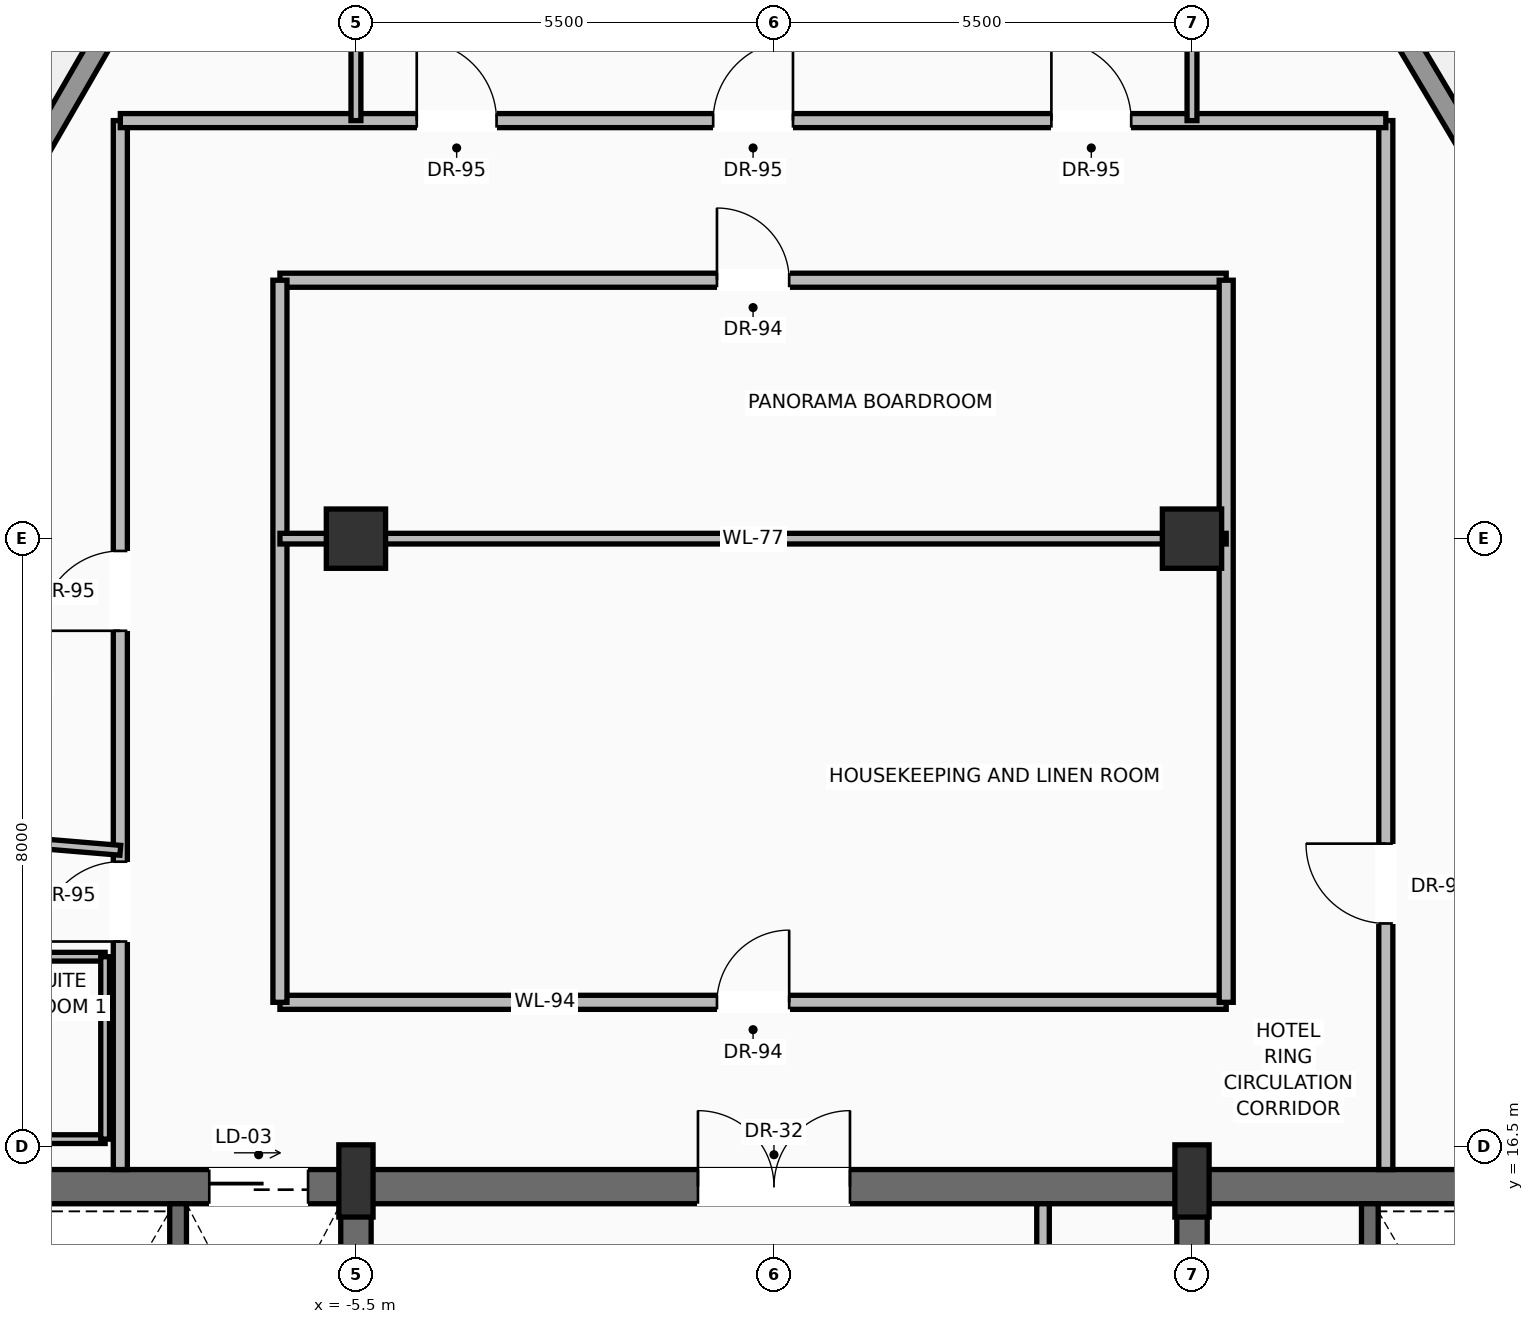
"""IFC4 building model, lengths in metres.
Left out: names, types, materials, properties, quantities, classifications, styles, units other than length and angle.
Written with IfcOpenShell. Run it as: python <this file> out.ifc"""

import sys

from ifc_helpers import new_model, si_unit, direction, frame, frame_2d, origin, origin_2d, place, context, subcontext, project, spatial, rectangle, extrude, source, transform, mapped, element, fill, save


model = new_model("IFC4")
c1 = context("Model", 3, precision=1e-05, world=origin(), true_north=direction((0.0, 1.0)))
c2 = subcontext(c1, "Body", "Model", "MODEL_VIEW")
j1 = project(units=[si_unit("LENGTHUNIT", "METRE"), si_unit("PLANEANGLEUNIT", "RADIAN")], contexts=[c1])
p1 = place(None, origin())
s1 = spatial("IfcSite", under=j1, at=p1, CompositionType="ELEMENT")
p2 = place(p1, origin())
s2 = spatial("IfcBuilding", under=s1, at=p2, CompositionType="ELEMENT")
p3 = place(p2, frame((0.0, 0.0, 273.0)))
s3 = spatial("IfcBuildingStorey", under=s2, at=p3, CompositionType="ELEMENT", Elevation=273.0)
p4 = place(p3, frame((-10.6, 15.975, 0.0), z_axis=(0.0, 0.0, 1.0), x_axis=(1.0, 0.0, 0.0)))
e1 = element("IfcWall", 1, at=p4, inside=s3, PredefinedType="SHEAR", context=c2, shape_type="SweptSolid", body=[
    extrude(rectangle(XDim=21.2, YDim=0.45, at=frame_2d((10.6, 0.0))), origin(), (0.0, 0.0, 1.0), 3.24),
])
p5 = place(p4, frame((3.17, 0.0, 0.0)))
e2 = element("IfcOpeningElement", 2, at=p5, cuts=e1, PredefinedType="OPENING", context=c2, shape_type="SweptSolid", body=[
    extrude(rectangle(XDim=1.3, YDim=2.3, at=frame_2d((0.65, 1.15))), frame((0.0, 0.235, 0.0), z_axis=(0.0, -1.0, 0.0), x_axis=(1.0, 0.0, 0.0)), (0.0, 0.0, 1.0), 0.47),
])
p6 = place(p4, frame((9.6, 0.0, 0.0)))
e3 = element("IfcOpeningElement", 3, at=p6, cuts=e1, PredefinedType="OPENING", context=c2, shape_type="SweptSolid", body=[
    extrude(rectangle(XDim=2.0, YDim=2.4, at=frame_2d((1.0, 1.2))), frame((0.0, 0.235, 0.0), z_axis=(0.0, -1.0, 0.0), x_axis=(1.0, 0.0, 0.0)), (0.0, 0.0, 1.0), 0.47),
])
p7 = place(p3, frame((-5.5, 0.625, 0.0), z_axis=(0.0, 0.0, 1.0), x_axis=(0.0, 1.0, 0.0)))
e4 = element("IfcWall", 4, at=p7, inside=s3, PredefinedType="SHEAR", context=c2, shape_type="SweptSolid", body=[
    extrude(rectangle(XDim=15.35, YDim=0.4, at=frame_2d((7.675, 0.0))), origin(), (0.0, 0.0, 1.0), 3.24),
])
p8 = place(p7, frame((8.875, 0.0, 0.0)))
e5 = element("IfcOpeningElement", 5, at=p8, cuts=e4, PredefinedType="OPENING", context=c2, shape_type="SweptSolid", body=[
    extrude(rectangle(XDim=1.1, YDim=2.2, at=frame_2d((0.55, 1.1))), frame((0.0, 0.21, 0.0), z_axis=(0.0, -1.0, 0.0), x_axis=(1.0, 0.0, 0.0)), (0.0, 0.0, 1.0), 0.42),
])
p9 = place(p3, frame((5.5, 0.625, 0.0), z_axis=(0.0, 0.0, 1.0), x_axis=(0.0, 1.0, 0.0)))
e6 = element("IfcWall", 6, at=p9, inside=s3, PredefinedType="SHEAR", context=c2, shape_type="SweptSolid", body=[
    extrude(rectangle(XDim=15.35, YDim=0.4, at=frame_2d((7.675, 0.0))), origin(), (0.0, 0.0, 1.0), 3.24),
])
p10 = place(p9, frame((8.875, 0.0, 0.0)))
e7 = element("IfcOpeningElement", 7, at=p10, cuts=e6, PredefinedType="OPENING", context=c2, shape_type="SweptSolid", body=[
    extrude(rectangle(XDim=1.1, YDim=2.2, at=frame_2d((0.55, 1.1))), frame((0.0, 0.21, 0.0), z_axis=(0.0, -1.0, 0.0), x_axis=(1.0, 0.0, 0.0)), (0.0, 0.0, 1.0), 0.42),
])
m1 = source(origin(), c2, "Body", "SweptSolid", [
    extrude(rectangle(XDim=0.45, YDim=0.95, at=origin_2d()), origin(), (0.0, 0.0, 1.0), 3.45),
])
for number, where, z_axis, x_axis in (
    (8, (-5.5, 16.05, 0.0), (0.0, 0.0, 1.0), (1.0, 0.0, 0.0)),
    (9, (5.5, 16.05, 0.0), (0.0, 0.0, 1.0), (1.0, 0.0, 0.0)),
):
    element("IfcColumn", number, at=place(p3, frame(where, z_axis=z_axis, x_axis=x_axis)), inside=s3, PredefinedType="PILASTER", context=c2, shape_type="MappedRepresentation", body=[
        mapped(m1, transform((0.0, 0.0, 0.0), scale=1.0)),
    ])
m2 = source(origin(), c2, "Body", "SweptSolid", [
    extrude(rectangle(XDim=0.78, YDim=0.78, at=origin_2d()), origin(), (0.0, 0.0, 1.0), 3.45),
])
for number, where, z_axis, x_axis in (
    (10, (-5.5, 24.5, 0.0), (0.0, 0.0, 1.0), (1.0, 0.0, 0.0)),
    (11, (5.5, 24.5, 0.0), (0.0, 0.0, 1.0), (1.0, 0.0, 0.0)),
):
    element("IfcColumn", number, at=place(p3, frame(where, z_axis=z_axis, x_axis=x_axis)), inside=s3, PredefinedType="COLUMN", context=c2, shape_type="MappedRepresentation", body=[
        mapped(m2, transform((0.0, 0.0, 0.0), scale=1.0)),
    ])
p11 = place(p3, frame((-18.529, 14.308, 0.0), z_axis=(0.0, 0.0, 1.0), x_axis=(0.500615740451, 0.86566961389, 0.0)))
e12 = element("IfcWall", 12, at=p11, inside=s3, PredefinedType="SOLIDWALL", context=c2, shape_type="SweptSolid", body=[
    extrude(rectangle(XDim=20.05, YDim=0.28, at=frame_2d((10.025, 0.0))), origin(), (0.0, 0.0, 1.0), 2.82),
])
p12 = place(p11, frame((4.812, 0.0, 0.0)))
e13 = element("IfcOpeningElement", 13, at=p12, cuts=e12, PredefinedType="OPENING", context=c2, shape_type="SweptSolid", body=[
    extrude(rectangle(XDim=1.6, YDim=2.35, at=frame_2d((0.8, 1.175))), frame((0.0, 0.15, 0.0), z_axis=(0.0, -1.0, 0.0), x_axis=(1.0, 0.0, 0.0)), (0.0, 0.0, 1.0), 0.3),
])
p13 = place(p11, frame((13.634, 0.0, 0.9)))
e14 = element("IfcOpeningElement", 14, at=p13, cuts=e12, PredefinedType="OPENING", context=c2, shape_type="SweptSolid", body=[
    extrude(rectangle(XDim=1.55, YDim=1.75, at=frame_2d((0.775, 0.875))), frame((0.0, 0.15, 0.0), z_axis=(0.0, -1.0, 0.0), x_axis=(1.0, 0.0, 0.0)), (0.0, 0.0, 1.0), 0.3),
])
p14 = place(p3, frame((7.892, 31.777, 0.0), z_axis=(0.0, 0.0, 1.0), x_axis=(0.511386799139, -0.85935065117, 0.0)))
e15 = element("IfcWall", 15, at=p14, inside=s3, PredefinedType="SOLIDWALL", context=c2, shape_type="SweptSolid", body=[
    extrude(rectangle(XDim=19.989, YDim=0.28, at=frame_2d((9.994, 0.0))), origin(), (0.0, 0.0, 1.0), 2.82),
])
p15 = place(p14, frame((4.797, 0.0, 0.0)))
e16 = element("IfcOpeningElement", 16, at=p15, cuts=e15, PredefinedType="OPENING", context=c2, shape_type="SweptSolid", body=[
    extrude(rectangle(XDim=1.6, YDim=2.35, at=frame_2d((0.8, 1.175))), frame((0.0, 0.15, 0.0), z_axis=(0.0, -1.0, 0.0), x_axis=(1.0, 0.0, 0.0)), (0.0, 0.0, 1.0), 0.3),
])
p16 = place(p14, frame((13.592, 0.0, 0.9)))
e17 = element("IfcOpeningElement", 17, at=p16, cuts=e15, PredefinedType="OPENING", context=c2, shape_type="SweptSolid", body=[
    extrude(rectangle(XDim=1.55, YDim=1.75, at=frame_2d((0.775, 0.875))), frame((0.0, 0.15, 0.0), z_axis=(0.0, -1.0, 0.0), x_axis=(1.0, 0.0, 0.0)), (0.0, 0.0, 1.0), 0.3),
])
for number, where, z_axis, x_axis in (
    (18, (-7.84, 11.87, 0.0), (0.0, 0.0, 1.0), (0.0, 1.0, 0.0)),
    (19, (7.84, 11.87, 0.0), (0.0, 0.0, 1.0), (0.0, 1.0, 0.0)),
):
    element("IfcWall", number, at=place(p3, frame(where, z_axis=z_axis, x_axis=x_axis)), inside=s3, PredefinedType="SOLIDWALL", context=c2, shape_type="SweptSolid", body=[
        extrude(rectangle(XDim=3.88, YDim=0.22, at=frame_2d((1.94, 0.0))), origin(), (0.0, 0.0, 1.0), 3.24),
    ])
p17 = place(p3, frame((3.54, 11.22, 0.0), z_axis=(0.0, 0.0, 1.0), x_axis=(0.0, 1.0, 0.0)))
e20 = element("IfcWall", 20, at=p17, inside=s3, PredefinedType="PARTITIONING", context=c2, shape_type="SweptSolid", body=[
    extrude(rectangle(XDim=4.53, YDim=0.165, at=frame_2d((2.265, 0.0))), origin(), (0.0, 0.0, 1.0), 3.232),
])
p18 = place(p17, frame((1.25, 0.0, 0.0)))
e21 = element("IfcOpeningElement", 21, at=p18, cuts=e20, PredefinedType="OPENING", context=c2, shape_type="SweptSolid", body=[
    extrude(rectangle(XDim=0.9, YDim=2.1, at=frame_2d((0.45, 1.05))), frame((0.0, 0.093, 0.0), z_axis=(0.0, -1.0, 0.0), x_axis=(1.0, 0.0, 0.0)), (0.0, 0.0, 1.0), 0.185),
])
p19 = place(p3, frame((-6.5, 18.4, 0.0), z_axis=(0.0, 0.0, 1.0), x_axis=(1.0, 0.0, 0.0)))
e22 = element("IfcWall", 22, at=p19, inside=s3, PredefinedType="PARTITIONING", context=c2, shape_type="SweptSolid", body=[
    extrude(rectangle(XDim=12.45, YDim=0.185, at=frame_2d((6.225, 0.0))), origin(), (0.0, 0.0, 1.0), 3.232),
])
p20 = place(p19, frame((5.75, 0.0, 0.0)))
e23 = element("IfcOpeningElement", 23, at=p20, cuts=e22, PredefinedType="OPENING", context=c2, shape_type="SweptSolid", body=[
    extrude(rectangle(XDim=0.95, YDim=2.2, at=frame_2d((0.475, 1.1))), frame((0.0, 0.103, 0.0), z_axis=(0.0, -1.0, 0.0), x_axis=(1.0, 0.0, 0.0)), (0.0, 0.0, 1.0), 0.205),
])
p21 = place(p3, frame((-6.5, 27.9, 0.0), z_axis=(0.0, 0.0, 1.0), x_axis=(1.0, 0.0, 0.0)))
e24 = element("IfcWall", 24, at=p21, inside=s3, PredefinedType="PARTITIONING", context=c2, shape_type="SweptSolid", body=[
    extrude(rectangle(XDim=12.45, YDim=0.185, at=frame_2d((6.225, 0.0))), origin(), (0.0, 0.0, 1.0), 2.885),
])
p22 = place(p21, frame((5.75, 0.0, 0.0)))
e25 = element("IfcOpeningElement", 25, at=p22, cuts=e24, PredefinedType="OPENING", context=c2, shape_type="SweptSolid", body=[
    extrude(rectangle(XDim=0.95, YDim=2.2, at=frame_2d((0.475, 1.1))), frame((0.0, 0.103, 0.0), z_axis=(0.0, -1.0, 0.0), x_axis=(1.0, 0.0, 0.0)), (0.0, 0.0, 1.0), 0.205),
])
for number, where, z_axis, x_axis in (
    (26, (-6.5, 18.4, 0.0), (0.0, 0.0, 1.0), (0.0, 1.0, 0.0)),
    (27, (5.95, 18.4, 0.0), (0.0, 0.0, 1.0), (0.0, 1.0, 0.0)),
):
    element("IfcWall", number, at=place(p3, frame(where, z_axis=z_axis, x_axis=x_axis)), inside=s3, PredefinedType="PARTITIONING", context=c2, shape_type="SweptSolid", body=[
        extrude(rectangle(XDim=9.5, YDim=0.185, at=frame_2d((4.75, 0.0))), origin(), (0.0, 0.0, 1.0), 3.232),
    ])
p23 = place(p3, frame((-8.6, 16.2, 0.0), z_axis=(0.0, 0.0, 1.0), x_axis=(0.0, 1.0, 0.0)))
e28 = element("IfcWall", 28, at=p23, inside=s3, PredefinedType="PARTITIONING", context=c2, shape_type="SweptSolid", body=[
    extrude(rectangle(XDim=13.8, YDim=0.185, at=frame_2d((6.9, 0.0))), origin(), (0.0, 0.0, 1.0), 3.232),
])
p24 = place(p23, frame((3.0, 0.0, 0.0)))
e29 = element("IfcOpeningElement", 29, at=p24, cuts=e28, PredefinedType="OPENING", context=c2, shape_type="SweptSolid", body=[
    extrude(rectangle(XDim=1.05, YDim=2.25, at=frame_2d((0.525, 1.125))), frame((0.0, 0.103, 0.0), z_axis=(0.0, -1.0, 0.0), x_axis=(1.0, 0.0, 0.0)), (0.0, 0.0, 1.0), 0.205),
])
p25 = place(p23, frame((7.088, 0.0, 0.0)))
e30 = element("IfcOpeningElement", 30, at=p25, cuts=e28, PredefinedType="OPENING", context=c2, shape_type="SweptSolid", body=[
    extrude(rectangle(XDim=1.05, YDim=2.25, at=frame_2d((0.525, 1.125))), frame((0.0, 0.103, 0.0), z_axis=(0.0, -1.0, 0.0), x_axis=(1.0, 0.0, 0.0)), (0.0, 0.0, 1.0), 0.205),
])
p26 = place(p3, frame((8.05, 16.2, 0.0), z_axis=(0.0, 0.0, 1.0), x_axis=(0.0, 1.0, 0.0)))
e31 = element("IfcWall", 31, at=p26, inside=s3, PredefinedType="PARTITIONING", context=c2, shape_type="SweptSolid", body=[
    extrude(rectangle(XDim=13.8, YDim=0.185, at=frame_2d((6.9, 0.0))), origin(), (0.0, 0.0, 1.0), 3.232),
])
p27 = place(p26, frame((3.238, 0.0, 0.0)))
e32 = element("IfcOpeningElement", 32, at=p27, cuts=e31, PredefinedType="OPENING", context=c2, shape_type="SweptSolid", body=[
    extrude(rectangle(XDim=1.05, YDim=2.25, at=frame_2d((0.525, 1.125))), frame((0.0, 0.103, 0.0), z_axis=(0.0, -1.0, 0.0), x_axis=(1.0, 0.0, 0.0)), (0.0, 0.0, 1.0), 0.205),
])
p28 = place(p3, frame((-8.6, 30.0, 0.0), z_axis=(0.0, 0.0, 1.0), x_axis=(1.0, 0.0, 0.0)))
e33 = element("IfcWall", 33, at=p28, inside=s3, PredefinedType="PARTITIONING", context=c2, shape_type="SweptSolid", body=[
    extrude(rectangle(XDim=16.65, YDim=0.185, at=frame_2d((8.325, 0.0))), origin(), (0.0, 0.0, 1.0), 3.232),
])
p29 = place(p28, frame((3.9, 0.0, 0.0)))
e34 = element("IfcOpeningElement", 34, at=p29, cuts=e33, PredefinedType="OPENING", context=c2, shape_type="SweptSolid", body=[
    extrude(rectangle(XDim=1.05, YDim=2.25, at=frame_2d((0.525, 1.125))), frame((0.0, 0.103, 0.0), z_axis=(0.0, -1.0, 0.0), x_axis=(1.0, 0.0, 0.0)), (0.0, 0.0, 1.0), 0.205),
])
p30 = place(p28, frame((7.8, 0.0, 0.0)))
e35 = element("IfcOpeningElement", 35, at=p30, cuts=e33, PredefinedType="OPENING", context=c2, shape_type="SweptSolid", body=[
    extrude(rectangle(XDim=1.05, YDim=2.25, at=frame_2d((0.525, 1.125))), frame((0.0, 0.103, 0.0), z_axis=(0.0, -1.0, 0.0), x_axis=(1.0, 0.0, 0.0)), (0.0, 0.0, 1.0), 0.205),
])
p31 = place(p28, frame((12.25, 0.0, 0.0)))
e36 = element("IfcOpeningElement", 36, at=p31, cuts=e33, PredefinedType="OPENING", context=c2, shape_type="SweptSolid", body=[
    extrude(rectangle(XDim=1.05, YDim=2.25, at=frame_2d((0.525, 1.125))), frame((0.0, 0.103, 0.0), z_axis=(0.0, -1.0, 0.0), x_axis=(1.0, 0.0, 0.0)), (0.0, 0.0, 1.0), 0.205),
])
p32 = place(p3, frame((-6.5, 24.5, 0.0), z_axis=(0.0, 0.0, 1.0), x_axis=(1.0, 0.0, 0.0)))
e37 = element("IfcWall", 37, at=p32, inside=s3, PredefinedType="PARTITIONING", context=c2, shape_type="SweptSolid", body=[
    extrude(rectangle(XDim=12.45, YDim=0.14, at=frame_2d((6.225, 0.0))), origin(), (0.0, 0.0, 1.0), 2.683),
])
p33 = place(p3, frame((-5.5, 30.0, 0.0), z_axis=(0.0, 0.0, 1.0), x_axis=(0.0, 1.0, 0.0)))
e38 = element("IfcWall", 38, at=p33, inside=s3, PredefinedType="PARTITIONING", context=c2, shape_type="SweptSolid", body=[
    extrude(rectangle(XDim=7.096, YDim=0.13, at=frame_2d((3.548, 0.0))), origin(), (0.0, 0.0, 1.0), 2.683),
])
p34 = place(p3, frame((5.5, 30.0, 0.0), z_axis=(0.0, 0.0, 1.0), x_axis=(0.0, 1.0, 0.0)))
e39 = element("IfcWall", 39, at=p34, inside=s3, PredefinedType="PARTITIONING", context=c2, shape_type="SweptSolid", body=[
    extrude(rectangle(XDim=6.05, YDim=0.13, at=frame_2d((3.025, 0.0))), origin(), (0.0, 0.0, 1.0), 2.683),
])
for number, where, z_axis, x_axis in (
    (40, (-11.45, 16.6, 0.0), (0.0, 0.0, 1.0), (1.0, 0.0, 0.0)),
    (41, (-11.45, 19.0, 0.0), (0.0, 0.0, 1.0), (1.0, 0.0, 0.0)),
):
    element("IfcWall", number, at=place(p3, frame(where, z_axis=z_axis, x_axis=x_axis)), inside=s3, PredefinedType="PARTITIONING", context=c2, shape_type="SweptSolid", body=[
        extrude(rectangle(XDim=2.65, YDim=0.115, at=frame_2d((1.325, 0.0))), origin(), (0.0, 0.0, 1.0), 3.232),
    ])
p35 = place(p3, frame((-8.8, 16.6, 0.0), z_axis=(0.0, 0.0, 1.0), x_axis=(0.0, 1.0, 0.0)))
e42 = element("IfcWall", 42, at=p35, inside=s3, PredefinedType="PARTITIONING", context=c2, shape_type="SweptSolid", body=[
    extrude(rectangle(XDim=2.4, YDim=0.115, at=frame_2d((1.2, 0.0))), origin(), (0.0, 0.0, 1.0), 3.232),
])
p36 = place(p3, frame((-14.855, 20.919, 0.0), z_axis=(0.0, 0.0, 1.0), x_axis=(0.996575202115, -0.082691393322, 0.0)))
e43 = element("IfcWall", 43, at=p36, inside=s3, PredefinedType="PARTITIONING", context=c2, shape_type="SweptSolid", body=[
    extrude(rectangle(XDim=6.277, YDim=0.13, at=frame_2d((3.138, 0.0))), origin(), (0.0, 0.0, 1.0), 3.232),
])
m3 = source(origin(), c2, "Body", "SweptSolid", [
    extrude(rectangle(XDim=1.3, YDim=2.3, at=frame_2d((0.65, 1.15))), frame((0.0, 0.025, 0.0), z_axis=(0.0, -1.0, 0.0), x_axis=(1.0, 0.0, 0.0)), (0.0, 0.0, 1.0), 0.05),
])
p37 = place(p5, origin())
e44 = element("IfcDoor", 44, at=p37, inside=s3, OperationType="SLIDING_TO_RIGHT", PredefinedType="DOOR", context=c2, shape_type="MappedRepresentation", body=[
    mapped(m3, transform((0.0, 0.0, 0.0), scale=1.0)),
])
fill(e2, e44)
m4 = source(origin(), c2, "Body", "SweptSolid", [
    extrude(rectangle(XDim=2.0, YDim=2.4, at=frame_2d((1.0, 1.2))), frame((0.0, 0.025, 0.0), z_axis=(0.0, -1.0, 0.0), x_axis=(1.0, 0.0, 0.0)), (0.0, 0.0, 1.0), 0.05),
])
p38 = place(p6, origin())
e45 = element("IfcDoor", 45, at=p38, inside=s3, OperationType="DOUBLE_DOOR_SINGLE_SWING", PredefinedType="DOOR", context=c2, shape_type="MappedRepresentation", body=[
    mapped(m4, transform((0.0, 0.0, 0.0), scale=1.0)),
])
fill(e3, e45)
m5 = source(origin(), c2, "Body", "SweptSolid", [
    extrude(rectangle(XDim=0.95, YDim=2.2, at=frame_2d((0.475, 1.1))), frame((0.0, 0.025, 0.0), z_axis=(0.0, -1.0, 0.0), x_axis=(1.0, 0.0, 0.0)), (0.0, 0.0, 1.0), 0.05),
])
p39 = place(p20, origin())
e46 = element("IfcDoor", 46, at=p39, inside=s3, OperationType="SINGLE_SWING_RIGHT", PredefinedType="DOOR", context=c2, shape_type="MappedRepresentation", body=[
    mapped(m5, transform((0.0, 0.0, 0.0), scale=1.0)),
])
fill(e23, e46)
p40 = place(p22, origin())
e47 = element("IfcDoor", 47, at=p40, inside=s3, OperationType="SINGLE_SWING_LEFT", PredefinedType="DOOR", context=c2, shape_type="MappedRepresentation", body=[
    mapped(m5, transform((0.0, 0.0, 0.0), scale=1.0)),
])
fill(e25, e47)
m6 = source(origin(), c2, "Body", "SweptSolid", [
    extrude(rectangle(XDim=1.05, YDim=2.25, at=frame_2d((0.525, 1.125))), frame((0.0, 0.025, 0.0), z_axis=(0.0, -1.0, 0.0), x_axis=(1.0, 0.0, 0.0)), (0.0, 0.0, 1.0), 0.05),
])
p41 = place(p24, origin())
e48 = element("IfcDoor", 48, at=p41, inside=s3, OperationType="SINGLE_SWING_LEFT", PredefinedType="DOOR", context=c2, shape_type="MappedRepresentation", body=[
    mapped(m6, transform((0.0, 0.0, 0.0), scale=1.0)),
])
fill(e29, e48)
p42 = place(p25, origin())
e49 = element("IfcDoor", 49, at=p42, inside=s3, OperationType="SINGLE_SWING_LEFT", PredefinedType="DOOR", context=c2, shape_type="MappedRepresentation", body=[
    mapped(m6, transform((0.0, 0.0, 0.0), scale=1.0)),
])
fill(e30, e49)
p43 = place(p27, origin())
e50 = element("IfcDoor", 50, at=p43, inside=s3, OperationType="SINGLE_SWING_RIGHT", PredefinedType="DOOR", context=c2, shape_type="MappedRepresentation", body=[
    mapped(m6, transform((0.0, 0.0, 0.0), scale=1.0)),
])
fill(e32, e50)
p44 = place(p29, origin())
e51 = element("IfcDoor", 51, at=p44, inside=s3, OperationType="SINGLE_SWING_LEFT", PredefinedType="DOOR", context=c2, shape_type="MappedRepresentation", body=[
    mapped(m6, transform((0.0, 0.0, 0.0), scale=1.0)),
])
fill(e34, e51)
p45 = place(p30, origin())
e52 = element("IfcDoor", 52, at=p45, inside=s3, OperationType="SINGLE_SWING_RIGHT", PredefinedType="DOOR", context=c2, shape_type="MappedRepresentation", body=[
    mapped(m6, transform((0.0, 0.0, 0.0), scale=1.0)),
])
fill(e35, e52)
p46 = place(p31, origin())
e53 = element("IfcDoor", 53, at=p46, inside=s3, OperationType="SINGLE_SWING_LEFT", PredefinedType="DOOR", context=c2, shape_type="MappedRepresentation", body=[
    mapped(m6, transform((0.0, 0.0, 0.0), scale=1.0)),
])
fill(e36, e53)
save(model, sys.argv[1])
